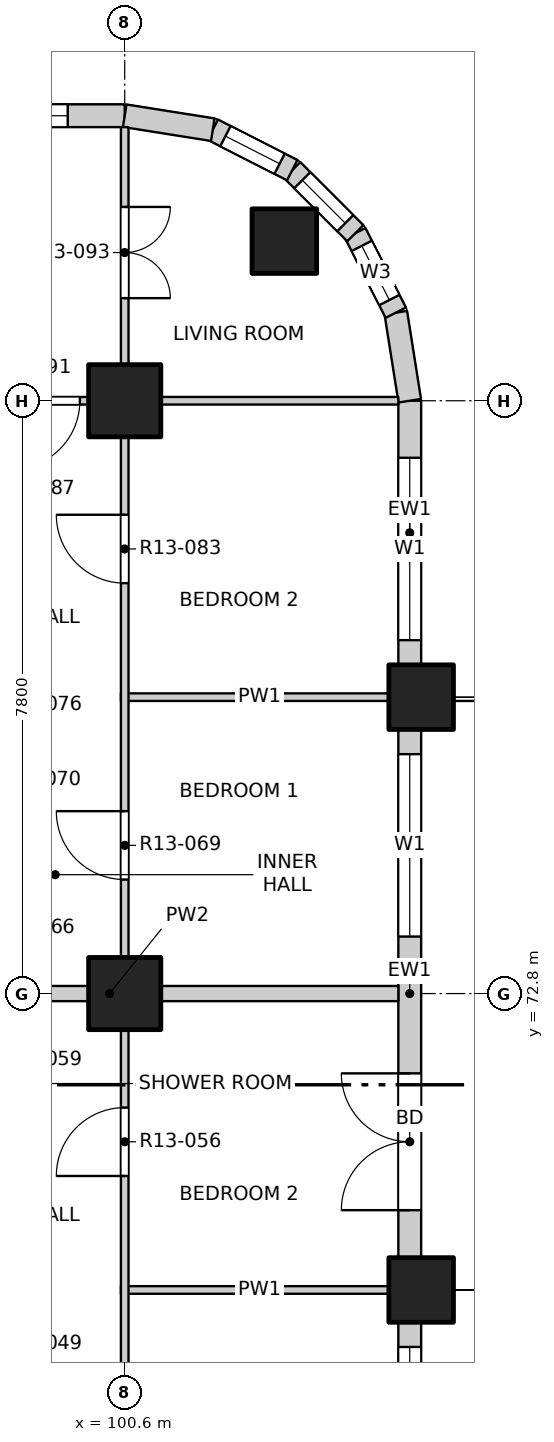
"""IFC4 building model, lengths in metres.
Left out: names, types, materials, properties, quantities, classifications, styles, units other than length and angle.
Written with IfcOpenShell. Run it as: python <this file> out.ifc"""

import sys

from ifc_helpers import new_model, si_unit, direction, frame, frame_2d, origin, origin_2d, place, context, subcontext, project, spatial, rectangle, extrude, element, fill, save


model = new_model("IFC4")
c1 = context("Model", 3, precision=1e-05, world=origin(), true_north=direction((0.0, 1.0)))
c2 = subcontext(c1, "Body", "Model", "MODEL_VIEW")
j1 = project(units=[si_unit("LENGTHUNIT", "METRE"), si_unit("PLANEANGLEUNIT", "RADIAN")], contexts=[c1])
p1 = place(None, origin())
s1 = spatial("IfcSite", under=j1, at=p1, CompositionType="ELEMENT")
p2 = place(p1, origin())
s2 = spatial("IfcBuilding", under=s1, at=p2, CompositionType="ELEMENT")
p3 = place(p2, frame((0.0, 0.0, 140.7)))
s3 = spatial("IfcBuildingStorey", under=s2, at=p3, CompositionType="ELEMENT", Elevation=140.7)
for number, where, z_axis, x_axis in (
    (1, (102.7, 82.7, -0.25), (0.0, 0.0, 1.0), (1.0, 0.0, 0.0)),
    (2, (104.5, 68.9, -0.25), (0.0, 0.0, 1.0), (1.0, 0.0, 0.0)),
    (3, (104.5, 76.7, -0.25), (0.0, 0.0, 1.0), (1.0, 0.0, 0.0)),
):
    element("IfcColumn", number, at=place(p3, frame(where, z_axis=z_axis, x_axis=x_axis)), inside=s3, PredefinedType="COLUMN", context=c2, shape_type="SweptSolid", body=[
        extrude(rectangle(XDim=0.85, YDim=0.85, at=origin_2d()), origin(), (0.0, 0.0, 1.0), 3.35),
    ])
for number, where, z_axis, x_axis in (
    (4, (100.6, 72.8, -0.25), (0.0, 0.0, 1.0), (1.0, 0.0, 0.0)),
    (5, (100.6, 80.6, -0.25), (0.0, 0.0, 1.0), (1.0, 0.0, 0.0)),
):
    element("IfcColumn", number, at=place(p3, frame(where, z_axis=z_axis, x_axis=x_axis)), inside=s3, PredefinedType="COLUMN", context=c2, shape_type="SweptSolid", body=[
        extrude(rectangle(XDim=0.95, YDim=0.95, at=origin_2d()), origin(), (0.0, 0.0, 1.0), 3.35),
    ])
p4 = place(p3, frame((104.35, 61.525, 0.0), z_axis=(0.0, 0.0, 1.0), x_axis=(0.0, 1.0, 0.0)))
e6 = element("IfcWall", 6, at=p4, inside=s3, PredefinedType="SOLIDWALL", context=c2, shape_type="SweptSolid", body=[
    extrude(rectangle(XDim=6.95, YDim=0.3, at=frame_2d((3.475, 0.0))), origin(), (0.0, 0.0, 1.0), 3.1),
])
p5 = place(p4, frame((0.625, 0.0, 0.0)))
e7 = element("IfcOpeningElement", 7, at=p5, cuts=e6, PredefinedType="OPENING", context=c2, shape_type="SweptSolid", body=[
    extrude(rectangle(XDim=1.8, YDim=2.4, at=frame_2d((0.9, 1.2))), frame((0.0, 0.16, 0.0), z_axis=(0.0, -1.0, 0.0), x_axis=(1.0, 0.0, 0.0)), (0.0, 0.0, 1.0), 0.32),
])
p6 = place(p4, frame((4.225, 0.0, 0.9)))
e8 = element("IfcOpeningElement", 8, at=p6, cuts=e6, PredefinedType="OPENING", context=c2, shape_type="SweptSolid", body=[
    extrude(rectangle(XDim=2.4, YDim=1.8, at=frame_2d((1.2, 0.9))), frame((0.0, 0.16, 0.0), z_axis=(0.0, -1.0, 0.0), x_axis=(1.0, 0.0, 0.0)), (0.0, 0.0, 1.0), 0.32),
])
p7 = place(p3, frame((104.35, 69.325, 0.0), z_axis=(0.0, 0.0, 1.0), x_axis=(0.0, 1.0, 0.0)))
e9 = element("IfcWall", 9, at=p7, inside=s3, PredefinedType="SOLIDWALL", context=c2, shape_type="SweptSolid", body=[
    extrude(rectangle(XDim=6.95, YDim=0.3, at=frame_2d((3.475, 0.0))), origin(), (0.0, 0.0, 1.0), 3.1),
])
p8 = place(p7, frame((0.625, 0.0, 0.0)))
e10 = element("IfcOpeningElement", 10, at=p8, cuts=e9, PredefinedType="OPENING", context=c2, shape_type="SweptSolid", body=[
    extrude(rectangle(XDim=1.8, YDim=2.4, at=frame_2d((0.9, 1.2))), frame((0.0, 0.16, 0.0), z_axis=(0.0, -1.0, 0.0), x_axis=(1.0, 0.0, 0.0)), (0.0, 0.0, 1.0), 0.32),
])
p9 = place(p7, frame((4.225, 0.0, 0.9)))
e11 = element("IfcOpeningElement", 11, at=p9, cuts=e9, PredefinedType="OPENING", context=c2, shape_type="SweptSolid", body=[
    extrude(rectangle(XDim=2.4, YDim=1.8, at=frame_2d((1.2, 0.9))), frame((0.0, 0.16, 0.0), z_axis=(0.0, -1.0, 0.0), x_axis=(1.0, 0.0, 0.0)), (0.0, 0.0, 1.0), 0.32),
])
p10 = place(p3, frame((104.35, 77.125, 0.0), z_axis=(0.0, 0.0, 1.0), x_axis=(0.0, 1.0, 0.0)))
e12 = element("IfcWall", 12, at=p10, inside=s3, PredefinedType="SOLIDWALL", context=c2, shape_type="SweptSolid", body=[
    extrude(rectangle(XDim=3.475, YDim=0.3, at=frame_2d((1.738, 0.0))), origin(), (0.0, 0.0, 1.0), 3.1),
])
p11 = place(p10, frame((0.325, 0.0, 0.9)))
e13 = element("IfcOpeningElement", 13, at=p11, cuts=e12, PredefinedType="OPENING", context=c2, shape_type="SweptSolid", body=[
    extrude(rectangle(XDim=2.4, YDim=1.8, at=frame_2d((1.2, 0.9))), frame((0.0, 0.16, 0.0), z_axis=(0.0, -1.0, 0.0), x_axis=(1.0, 0.0, 0.0)), (0.0, 0.0, 1.0), 0.32),
])
p12 = place(p3, frame((97.125, 84.35, 0.0), z_axis=(0.0, 0.0, 1.0), x_axis=(1.0, 0.0, 0.0)))
e14 = element("IfcWall", 14, at=p12, inside=s3, PredefinedType="SOLIDWALL", context=c2, shape_type="SweptSolid", body=[
    extrude(rectangle(XDim=3.475, YDim=0.3, at=frame_2d((1.738, 0.0))), origin(), (0.0, 0.0, 1.0), 3.1),
])
p13 = place(p12, frame((0.325, 0.0, 0.9)))
e15 = element("IfcOpeningElement", 15, at=p13, cuts=e14, PredefinedType="OPENING", context=c2, shape_type="SweptSolid", body=[
    extrude(rectangle(XDim=2.4, YDim=1.8, at=frame_2d((1.2, 0.9))), frame((0.0, 0.16, 0.0), z_axis=(0.0, -1.0, 0.0), x_axis=(1.0, 0.0, 0.0)), (0.0, 0.0, 1.0), 0.32),
])
p14 = place(p3, frame((104.35, 80.6, 0.0), z_axis=(0.0, 0.0, 1.0), x_axis=(-0.156496880861, 0.987678452879, 0.0)))
e16 = element("IfcWall", 16, at=p14, inside=s3, PredefinedType="SOLIDWALL", context=c2, shape_type="SweptSolid", body=[
    extrude(rectangle(XDim=1.173, YDim=0.3, at=frame_2d((0.586, 0.0))), origin(), (0.0, 0.0, 1.0), 3.1),
])
p15 = place(p3, frame((104.167, 81.759, 0.0), z_axis=(0.0, 0.0, 1.0), x_axis=(-0.454025524128, 0.890988677504, 0.0)))
e17 = element("IfcWall", 17, at=p15, inside=s3, PredefinedType="SOLIDWALL", context=c2, shape_type="SweptSolid", body=[
    extrude(rectangle(XDim=1.173, YDim=0.3, at=frame_2d((0.587, 0.0))), origin(), (0.0, 0.0, 1.0), 3.1),
])
p16 = place(p15, frame((0.187, 0.0, 0.9)))
e18 = element("IfcOpeningElement", 18, at=p16, cuts=e17, PredefinedType="OPENING", context=c2, shape_type="SweptSolid", body=[
    extrude(rectangle(XDim=0.8, YDim=1.2, at=frame_2d((0.4, 0.6))), frame((0.0, 0.16, 0.0), z_axis=(0.0, -1.0, 0.0), x_axis=(1.0, 0.0, 0.0)), (0.0, 0.0, 1.0), 0.32),
])
p17 = place(p3, frame((103.634, 82.804, 0.0), z_axis=(0.0, 0.0, 1.0), x_axis=(-0.707106781187, 0.707106781187, 0.0)))
e19 = element("IfcWall", 19, at=p17, inside=s3, PredefinedType="SOLIDWALL", context=c2, shape_type="SweptSolid", body=[
    extrude(rectangle(XDim=1.173, YDim=0.3, at=frame_2d((0.586, 0.0))), origin(), (0.0, 0.0, 1.0), 3.1),
])
p18 = place(p17, frame((0.187, 0.0, 0.9)))
e20 = element("IfcOpeningElement", 20, at=p18, cuts=e19, PredefinedType="OPENING", context=c2, shape_type="SweptSolid", body=[
    extrude(rectangle(XDim=0.8, YDim=1.2, at=frame_2d((0.4, 0.6))), frame((0.0, 0.16, 0.0), z_axis=(0.0, -1.0, 0.0), x_axis=(1.0, 0.0, 0.0)), (0.0, 0.0, 1.0), 0.32),
])
p19 = place(p3, frame((102.804, 83.634, 0.0), z_axis=(0.0, 0.0, 1.0), x_axis=(-0.890988677504, 0.454025524128, 0.0)))
e21 = element("IfcWall", 21, at=p19, inside=s3, PredefinedType="SOLIDWALL", context=c2, shape_type="SweptSolid", body=[
    extrude(rectangle(XDim=1.173, YDim=0.3, at=frame_2d((0.587, 0.0))), origin(), (0.0, 0.0, 1.0), 3.1),
])
p20 = place(p19, frame((0.187, 0.0, 0.9)))
e22 = element("IfcOpeningElement", 22, at=p20, cuts=e21, PredefinedType="OPENING", context=c2, shape_type="SweptSolid", body=[
    extrude(rectangle(XDim=0.8, YDim=1.2, at=frame_2d((0.4, 0.6))), frame((0.0, 0.16, 0.0), z_axis=(0.0, -1.0, 0.0), x_axis=(1.0, 0.0, 0.0)), (0.0, 0.0, 1.0), 0.32),
])
p21 = place(p3, frame((101.759, 84.167, 0.0), z_axis=(0.0, 0.0, 1.0), x_axis=(-0.987678452879, 0.156496880861, 0.0)))
e23 = element("IfcWall", 23, at=p21, inside=s3, PredefinedType="SOLIDWALL", context=c2, shape_type="SweptSolid", body=[
    extrude(rectangle(XDim=1.173, YDim=0.3, at=frame_2d((0.586, 0.0))), origin(), (0.0, 0.0, 1.0), 3.1),
])
p22 = place(p3, frame((100.55, 68.9, 0.0), z_axis=(0.0, 0.0, 1.0), x_axis=(1.0, 0.0, 0.0)))
e24 = element("IfcWall", 24, at=p22, inside=s3, PredefinedType="PARTITIONING", context=c2, shape_type="SweptSolid", body=[
    extrude(rectangle(XDim=3.65, YDim=0.1, at=frame_2d((1.825, 0.0))), origin(), (0.0, 0.0, 1.0), 3.1),
])
p23 = place(p3, frame((96.6, 72.8, 0.0), z_axis=(0.0, 0.0, 1.0), x_axis=(1.0, 0.0, 0.0)))
e25 = element("IfcWall", 25, at=p23, inside=s3, PredefinedType="PARTITIONING", context=c2, shape_type="SweptSolid", body=[
    extrude(rectangle(XDim=7.6, YDim=0.2, at=frame_2d((3.8, 0.0))), origin(), (0.0, 0.0, 1.0), 3.1),
])
p24 = place(p3, frame((100.55, 76.7, 0.0), z_axis=(0.0, 0.0, 1.0), x_axis=(1.0, 0.0, 0.0)))
e26 = element("IfcWall", 26, at=p24, inside=s3, PredefinedType="PARTITIONING", context=c2, shape_type="SweptSolid", body=[
    extrude(rectangle(XDim=3.65, YDim=0.1, at=frame_2d((1.825, 0.0))), origin(), (0.0, 0.0, 1.0), 3.1),
])
p25 = place(p3, frame((96.6, 80.6, 0.0), z_axis=(0.0, 0.0, 1.0), x_axis=(1.0, 0.0, 0.0)))
e27 = element("IfcWall", 27, at=p25, inside=s3, PredefinedType="PARTITIONING", context=c2, shape_type="SweptSolid", body=[
    extrude(rectangle(XDim=7.6, YDim=0.1, at=frame_2d((3.8, 0.0))), origin(), (0.0, 0.0, 1.0), 3.1),
])
p26 = place(p25, frame((2.51, 0.0, 0.0)))
e28 = element("IfcOpeningElement", 28, at=p26, cuts=e27, PredefinedType="OPENING", context=c2, shape_type="SweptSolid", body=[
    extrude(rectangle(XDim=0.9, YDim=2.1, at=frame_2d((0.45, 1.05))), frame((0.0, 0.06, 0.0), z_axis=(0.0, -1.0, 0.0), x_axis=(1.0, 0.0, 0.0)), (0.0, 0.0, 1.0), 0.12),
])
p27 = place(p3, frame((100.6, 45.8, 0.0), z_axis=(0.0, 0.0, 1.0), x_axis=(0.0, 1.0, 0.0)))
e29 = element("IfcWall", 29, at=p27, inside=s3, PredefinedType="PARTITIONING", context=c2, shape_type="SweptSolid", body=[
    extrude(rectangle(XDim=38.4, YDim=0.1, at=frame_2d((19.2, 0.0))), origin(), (0.0, 0.0, 1.0), 3.1),
])
p28 = place(p27, frame((1.05, 0.0, 0.0)))
e30 = element("IfcOpeningElement", 30, at=p28, cuts=e29, PredefinedType="OPENING", context=c2, shape_type="SweptSolid", body=[
    extrude(rectangle(XDim=1.2, YDim=2.1, at=frame_2d((0.6, 1.05))), frame((0.0, 0.06, 0.0), z_axis=(0.0, -1.0, 0.0), x_axis=(1.0, 0.0, 0.0)), (0.0, 0.0, 1.0), 0.12),
])
p29 = place(p27, frame((5.1, 0.0, 0.0)))
e31 = element("IfcOpeningElement", 31, at=p29, cuts=e29, PredefinedType="OPENING", context=c2, shape_type="SweptSolid", body=[
    extrude(rectangle(XDim=0.9, YDim=2.1, at=frame_2d((0.45, 1.05))), frame((0.0, 0.06, 0.0), z_axis=(0.0, -1.0, 0.0), x_axis=(1.0, 0.0, 0.0)), (0.0, 0.0, 1.0), 0.12),
])
p30 = place(p27, frame((9.0, 0.0, 0.0)))
e32 = element("IfcOpeningElement", 32, at=p30, cuts=e29, PredefinedType="OPENING", context=c2, shape_type="SweptSolid", body=[
    extrude(rectangle(XDim=0.9, YDim=2.1, at=frame_2d((0.45, 1.05))), frame((0.0, 0.06, 0.0), z_axis=(0.0, -1.0, 0.0), x_axis=(1.0, 0.0, 0.0)), (0.0, 0.0, 1.0), 0.12),
])
p31 = place(p27, frame((12.9, 0.0, 0.0)))
e33 = element("IfcOpeningElement", 33, at=p31, cuts=e29, PredefinedType="OPENING", context=c2, shape_type="SweptSolid", body=[
    extrude(rectangle(XDim=0.9, YDim=2.1, at=frame_2d((0.45, 1.05))), frame((0.0, 0.06, 0.0), z_axis=(0.0, -1.0, 0.0), x_axis=(1.0, 0.0, 0.0)), (0.0, 0.0, 1.0), 0.12),
])
p32 = place(p27, frame((16.8, 0.0, 0.0)))
e34 = element("IfcOpeningElement", 34, at=p32, cuts=e29, PredefinedType="OPENING", context=c2, shape_type="SweptSolid", body=[
    extrude(rectangle(XDim=0.9, YDim=2.1, at=frame_2d((0.45, 1.05))), frame((0.0, 0.06, 0.0), z_axis=(0.0, -1.0, 0.0), x_axis=(1.0, 0.0, 0.0)), (0.0, 0.0, 1.0), 0.12),
])
p33 = place(p27, frame((20.7, 0.0, 0.0)))
e35 = element("IfcOpeningElement", 35, at=p33, cuts=e29, PredefinedType="OPENING", context=c2, shape_type="SweptSolid", body=[
    extrude(rectangle(XDim=0.9, YDim=2.1, at=frame_2d((0.45, 1.05))), frame((0.0, 0.06, 0.0), z_axis=(0.0, -1.0, 0.0), x_axis=(1.0, 0.0, 0.0)), (0.0, 0.0, 1.0), 0.12),
])
p34 = place(p27, frame((24.6, 0.0, 0.0)))
e36 = element("IfcOpeningElement", 36, at=p34, cuts=e29, PredefinedType="OPENING", context=c2, shape_type="SweptSolid", body=[
    extrude(rectangle(XDim=0.9, YDim=2.1, at=frame_2d((0.45, 1.05))), frame((0.0, 0.06, 0.0), z_axis=(0.0, -1.0, 0.0), x_axis=(1.0, 0.0, 0.0)), (0.0, 0.0, 1.0), 0.12),
])
p35 = place(p27, frame((28.5, 0.0, 0.0)))
e37 = element("IfcOpeningElement", 37, at=p35, cuts=e29, PredefinedType="OPENING", context=c2, shape_type="SweptSolid", body=[
    extrude(rectangle(XDim=0.9, YDim=2.1, at=frame_2d((0.45, 1.05))), frame((0.0, 0.06, 0.0), z_axis=(0.0, -1.0, 0.0), x_axis=(1.0, 0.0, 0.0)), (0.0, 0.0, 1.0), 0.12),
])
p36 = place(p27, frame((32.4, 0.0, 0.0)))
e38 = element("IfcOpeningElement", 38, at=p36, cuts=e29, PredefinedType="OPENING", context=c2, shape_type="SweptSolid", body=[
    extrude(rectangle(XDim=0.9, YDim=2.1, at=frame_2d((0.45, 1.05))), frame((0.0, 0.06, 0.0), z_axis=(0.0, -1.0, 0.0), x_axis=(1.0, 0.0, 0.0)), (0.0, 0.0, 1.0), 0.12),
])
p37 = place(p27, frame((36.15, 0.0, 0.0)))
e39 = element("IfcOpeningElement", 39, at=p37, cuts=e29, PredefinedType="OPENING", context=c2, shape_type="SweptSolid", body=[
    extrude(rectangle(XDim=1.2, YDim=2.1, at=frame_2d((0.6, 1.05))), frame((0.0, 0.06, 0.0), z_axis=(0.0, -1.0, 0.0), x_axis=(1.0, 0.0, 0.0)), (0.0, 0.0, 1.0), 0.12),
])
p38 = place(p6, origin())
e40 = element("IfcWindow", 40, at=p38, inside=s3, PartitioningType="DOUBLE_PANEL_VERTICAL", PredefinedType="WINDOW", context=c2, shape_type="SweptSolid", body=[
    extrude(rectangle(XDim=2.4, YDim=1.8, at=frame_2d((1.2, 0.9))), frame((0.0, 0.03, 0.0), z_axis=(0.0, -1.0, 0.0), x_axis=(1.0, 0.0, 0.0)), (0.0, 0.0, 1.0), 0.06),
])
fill(e8, e40)
p39 = place(p8, origin())
e41 = element("IfcDoor", 41, at=p39, inside=s3, OperationType="DOUBLE_DOOR_SINGLE_SWING", PredefinedType="DOOR", context=c2, shape_type="SweptSolid", body=[
    extrude(rectangle(XDim=1.8, YDim=2.4, at=frame_2d((0.9, 1.2))), frame((0.0, 0.025, 0.0), z_axis=(0.0, -1.0, 0.0), x_axis=(1.0, 0.0, 0.0)), (0.0, 0.0, 1.0), 0.05),
])
fill(e10, e41)
p40 = place(p9, origin())
e42 = element("IfcWindow", 42, at=p40, inside=s3, PartitioningType="DOUBLE_PANEL_VERTICAL", PredefinedType="WINDOW", context=c2, shape_type="SweptSolid", body=[
    extrude(rectangle(XDim=2.4, YDim=1.8, at=frame_2d((1.2, 0.9))), frame((0.0, 0.03, 0.0), z_axis=(0.0, -1.0, 0.0), x_axis=(1.0, 0.0, 0.0)), (0.0, 0.0, 1.0), 0.06),
])
fill(e11, e42)
p41 = place(p11, origin())
e43 = element("IfcWindow", 43, at=p41, inside=s3, PartitioningType="DOUBLE_PANEL_VERTICAL", PredefinedType="WINDOW", context=c2, shape_type="SweptSolid", body=[
    extrude(rectangle(XDim=2.4, YDim=1.8, at=frame_2d((1.2, 0.9))), frame((0.0, 0.03, 0.0), z_axis=(0.0, -1.0, 0.0), x_axis=(1.0, 0.0, 0.0)), (0.0, 0.0, 1.0), 0.06),
])
fill(e13, e43)
p42 = place(p13, origin())
e44 = element("IfcWindow", 44, at=p42, inside=s3, PartitioningType="DOUBLE_PANEL_VERTICAL", PredefinedType="WINDOW", context=c2, shape_type="SweptSolid", body=[
    extrude(rectangle(XDim=2.4, YDim=1.8, at=frame_2d((1.2, 0.9))), frame((0.0, 0.03, 0.0), z_axis=(0.0, -1.0, 0.0), x_axis=(1.0, 0.0, 0.0)), (0.0, 0.0, 1.0), 0.06),
])
fill(e15, e44)
p43 = place(p16, origin())
e45 = element("IfcWindow", 45, at=p43, inside=s3, PartitioningType="SINGLE_PANEL", PredefinedType="WINDOW", context=c2, shape_type="SweptSolid", body=[
    extrude(rectangle(XDim=0.8, YDim=1.2, at=frame_2d((0.4, 0.6))), frame((0.0, 0.03, 0.0), z_axis=(0.0, -1.0, 0.0), x_axis=(1.0, 0.0, 0.0)), (0.0, 0.0, 1.0), 0.06),
])
fill(e18, e45)
p44 = place(p18, origin())
e46 = element("IfcWindow", 46, at=p44, inside=s3, PartitioningType="SINGLE_PANEL", PredefinedType="WINDOW", context=c2, shape_type="SweptSolid", body=[
    extrude(rectangle(XDim=0.8, YDim=1.2, at=frame_2d((0.4, 0.6))), frame((0.0, 0.03, 0.0), z_axis=(0.0, -1.0, 0.0), x_axis=(1.0, 0.0, 0.0)), (0.0, 0.0, 1.0), 0.06),
])
fill(e20, e46)
p45 = place(p20, origin())
e47 = element("IfcWindow", 47, at=p45, inside=s3, PartitioningType="SINGLE_PANEL", PredefinedType="WINDOW", context=c2, shape_type="SweptSolid", body=[
    extrude(rectangle(XDim=0.8, YDim=1.2, at=frame_2d((0.4, 0.6))), frame((0.0, 0.03, 0.0), z_axis=(0.0, -1.0, 0.0), x_axis=(1.0, 0.0, 0.0)), (0.0, 0.0, 1.0), 0.06),
])
fill(e22, e47)
p46 = place(p34, origin())
e48 = element("IfcDoor", 48, at=p46, inside=s3, OperationType="SINGLE_SWING_LEFT", PredefinedType="DOOR", context=c2, shape_type="SweptSolid", body=[
    extrude(rectangle(XDim=0.9, YDim=2.1, at=frame_2d((0.45, 1.05))), frame((0.0, 0.025, 0.0), z_axis=(0.0, -1.0, 0.0), x_axis=(1.0, 0.0, 0.0)), (0.0, 0.0, 1.0), 0.05),
])
fill(e36, e48)
p47 = place(p35, origin())
e49 = element("IfcDoor", 49, at=p47, inside=s3, OperationType="SINGLE_SWING_RIGHT", PredefinedType="DOOR", context=c2, shape_type="SweptSolid", body=[
    extrude(rectangle(XDim=0.9, YDim=2.1, at=frame_2d((0.45, 1.05))), frame((0.0, 0.025, 0.0), z_axis=(0.0, -1.0, 0.0), x_axis=(1.0, 0.0, 0.0)), (0.0, 0.0, 1.0), 0.05),
])
fill(e37, e49)
p48 = place(p36, origin())
e50 = element("IfcDoor", 50, at=p48, inside=s3, OperationType="SINGLE_SWING_RIGHT", PredefinedType="DOOR", context=c2, shape_type="SweptSolid", body=[
    extrude(rectangle(XDim=0.9, YDim=2.1, at=frame_2d((0.45, 1.05))), frame((0.0, 0.025, 0.0), z_axis=(0.0, -1.0, 0.0), x_axis=(1.0, 0.0, 0.0)), (0.0, 0.0, 1.0), 0.05),
])
fill(e38, e50)
p49 = place(p26, origin())
e51 = element("IfcDoor", 51, at=p49, inside=s3, OperationType="SINGLE_SWING_RIGHT", PredefinedType="DOOR", context=c2, shape_type="SweptSolid", body=[
    extrude(rectangle(XDim=0.9, YDim=2.1, at=frame_2d((0.45, 1.05))), frame((0.0, 0.025, 0.0), z_axis=(0.0, -1.0, 0.0), x_axis=(1.0, 0.0, 0.0)), (0.0, 0.0, 1.0), 0.05),
])
fill(e28, e51)
p50 = place(p37, origin())
e52 = element("IfcDoor", 52, at=p50, inside=s3, OperationType="DOUBLE_DOOR_SINGLE_SWING", PredefinedType="DOOR", context=c2, shape_type="SweptSolid", body=[
    extrude(rectangle(XDim=1.2, YDim=2.1, at=frame_2d((0.6, 1.05))), frame((0.0, 0.025, 0.0), z_axis=(0.0, -1.0, 0.0), x_axis=(1.0, 0.0, 0.0)), (0.0, 0.0, 1.0), 0.05),
])
fill(e39, e52)
save(model, sys.argv[1])
